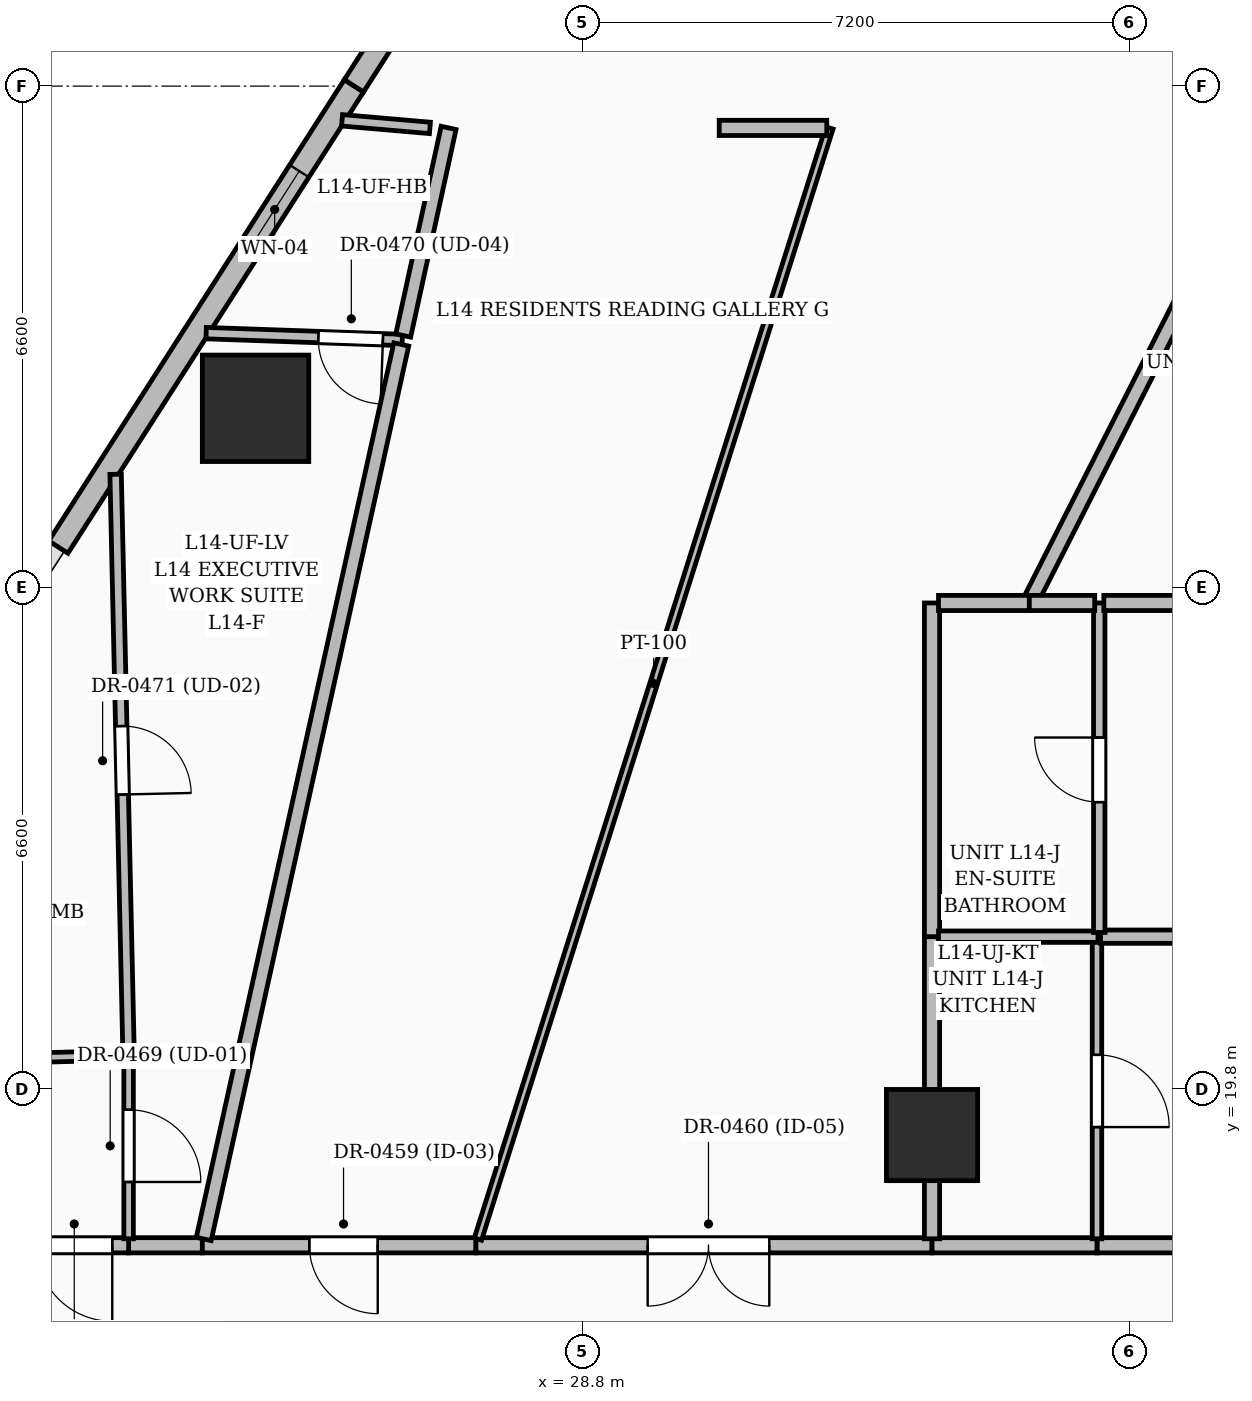
"""IFC4 building model, lengths in metres.
Left out: names, types, materials, properties, quantities, classifications, styles, units other than length and angle.
Written with IfcOpenShell. Run it as: python <this file> out.ifc"""

import sys

from ifc_helpers import new_model, si_unit, direction, frame, frame_2d, origin, origin_2d, place, context, subcontext, project, spatial, rectangle, extrude, element, fill, save


model = new_model("IFC4")
c1 = context("Model", 3, precision=1e-05, world=origin(), true_north=direction((0.0, 1.0)))
c2 = subcontext(c1, "Body", "Model", "MODEL_VIEW")
j1 = project(units=[si_unit("LENGTHUNIT", "METRE"), si_unit("PLANEANGLEUNIT", "RADIAN")], contexts=[c1])
p1 = place(None, origin())
s1 = spatial("IfcSite", under=j1, at=p1, CompositionType="ELEMENT")
p2 = place(p1, origin())
s2 = spatial("IfcBuilding", under=s1, at=p2, CompositionType="ELEMENT")
p3 = place(p2, frame((0.0, 0.0, 60.6)))
s3 = spatial("IfcBuildingStorey", under=s2, at=p3, CompositionType="ELEMENT", Elevation=60.6)
p4 = place(p3, frame((33.4, 19.2, 0.0), z_axis=(0.0, 0.0, 1.0), x_axis=(1.0, 0.0, 0.0)))
e1 = element("IfcColumn", 1, at=p4, inside=s3, PredefinedType="COLUMN", context=c2, shape_type="SweptSolid", body=[
    extrude(rectangle(XDim=1.2, YDim=1.2, at=origin_2d()), origin(), (0.0, 0.0, 1.0), 3.6),
])
p5 = place(p3, frame((24.5, 28.761, 0.0), z_axis=(0.0, 0.0, 1.0), x_axis=(1.0, 0.0, 0.0)))
e2 = element("IfcColumn", 2, at=p5, inside=s3, PredefinedType="COLUMN", context=c2, shape_type="SweptSolid", body=[
    extrude(rectangle(XDim=1.4, YDim=1.4, at=origin_2d()), origin(), (0.0, 0.0, 1.0), 3.6),
])
p6 = place(p3, frame((21.906, 26.935, 0.0), z_axis=(0.0, 0.0, 1.0), x_axis=(0.5395054239, 0.841982124265, 0.0)))
e3 = element("IfcWall", 3, at=p6, inside=s3, PredefinedType="SOLIDWALL", context=c2, shape_type="SweptSolid", body=[
    extrude(rectangle(XDim=7.207, YDim=0.3, at=frame_2d((3.604, 0.0))), origin(), (0.0, 0.0, 1.0), 3.35),
])
p7 = place(p6, frame((4.675, 0.0, 0.8)))
e4 = element("IfcOpeningElement", 4, at=p7, cuts=e3, PredefinedType="OPENING", context=c2, shape_type="SweptSolid", body=[
    extrude(rectangle(XDim=1.2, YDim=1.8, at=frame_2d((0.6, 0.9))), frame((0.0, 0.16, 0.0), z_axis=(0.0, -1.0, 0.0), x_axis=(1.0, 0.0, 0.0)), (0.0, 0.0, 1.0), 0.32),
])
p8 = place(p3, frame((25.794, 33.003, 0.0), z_axis=(0.0, 0.0, 1.0), x_axis=(0.539514050947, 0.841976596367, 0.0)))
e5 = element("IfcWall", 5, at=p8, inside=s3, PredefinedType="SOLIDWALL", context=c2, shape_type="SweptSolid", body=[
    extrude(rectangle(XDim=7.207, YDim=0.3, at=frame_2d((3.604, 0.0))), origin(), (0.0, 0.0, 1.0), 3.35),
])
p9 = place(p8, frame((3.325, 0.0, 0.6)))
e6 = element("IfcOpeningElement", 6, at=p9, cuts=e5, PredefinedType="OPENING", context=c2, shape_type="SweptSolid", body=[
    extrude(rectangle(XDim=2.4, YDim=2.1, at=frame_2d((1.2, 1.05))), frame((0.0, 0.16, 0.0), z_axis=(0.0, -1.0, 0.0), x_axis=(1.0, 0.0, 0.0)), (0.0, 0.0, 1.0), 0.32),
])
p10 = place(p3, frame((23.8, 17.75, 0.0), z_axis=(0.0, 0.0, 1.0), x_axis=(-1.0, 0.0, 0.0)))
e7 = element("IfcWall", 7, at=p10, inside=s3, PredefinedType="PARTITIONING", context=c2, shape_type="SweptSolid", body=[
    extrude(rectangle(XDim=0.97, YDim=0.2, at=frame_2d((0.485, 0.0))), origin(), (0.0, 0.0, 1.0), 2.279),
])
p11 = place(p3, frame((22.83, 17.75, 0.0), z_axis=(0.0, 0.0, 1.0), x_axis=(-1.0, 0.0, 0.0)))
e8 = element("IfcWall", 8, at=p11, inside=s3, PredefinedType="PARTITIONING", context=c2, shape_type="SweptSolid", body=[
    extrude(rectangle(XDim=1.345, YDim=0.2, at=frame_2d((0.672, 0.0))), origin(), (0.0, 0.0, 1.0), 3.35),
])
p12 = place(p11, frame((0.215, 0.0, 0.0)))
e9 = element("IfcOpeningElement", 9, at=p12, cuts=e8, PredefinedType="OPENING", context=c2, shape_type="SweptSolid", body=[
    extrude(rectangle(XDim=1.0, YDim=2.2, at=frame_2d((0.5, 1.1))), frame((0.0, 0.11, 0.0), z_axis=(0.0, -1.0, 0.0), x_axis=(1.0, 0.0, 0.0)), (0.0, 0.0, 1.0), 0.22),
])
p13 = place(p3, frame((27.4, 17.75, 0.0), z_axis=(0.0, 0.0, 1.0), x_axis=(-1.0, 0.0, 0.0)))
e10 = element("IfcWall", 10, at=p13, inside=s3, PredefinedType="PARTITIONING", context=c2, shape_type="SweptSolid", body=[
    extrude(rectangle(XDim=3.6, YDim=0.2, at=frame_2d((1.8, 0.0))), origin(), (0.0, 0.0, 1.0), 2.279),
])
p14 = place(p13, frame((1.292, 0.0, 0.0)))
e11 = element("IfcOpeningElement", 11, at=p14, cuts=e10, PredefinedType="OPENING", context=c2, shape_type="SweptSolid", body=[
    extrude(rectangle(XDim=0.9, YDim=2.1, at=frame_2d((0.45, 1.05))), frame((0.0, 0.11, 0.0), z_axis=(0.0, -1.0, 0.0), x_axis=(1.0, 0.0, 0.0)), (0.0, 0.0, 1.0), 0.22),
])
p15 = place(p3, frame((33.4, 17.75, 0.0), z_axis=(0.0, 0.0, 1.0), x_axis=(-1.0, 0.0, 0.0)))
e12 = element("IfcWall", 12, at=p15, inside=s3, PredefinedType="PARTITIONING", context=c2, shape_type="SweptSolid", body=[
    extrude(rectangle(XDim=6.0, YDim=0.2, at=frame_2d((3.0, 0.0))), origin(), (0.0, 0.0, 1.0), 3.35),
])
p16 = place(p15, frame((2.141, 0.0, 0.0)))
e13 = element("IfcOpeningElement", 13, at=p16, cuts=e12, PredefinedType="OPENING", context=c2, shape_type="SweptSolid", body=[
    extrude(rectangle(XDim=1.6, YDim=2.3, at=frame_2d((0.8, 1.15))), frame((0.0, 0.11, 0.0), z_axis=(0.0, -1.0, 0.0), x_axis=(1.0, 0.0, 0.0)), (0.0, 0.0, 1.0), 0.22),
])
p17 = place(p3, frame((41.05, 17.75, 0.0), z_axis=(0.0, 0.0, 1.0), x_axis=(-1.0, 0.0, 0.0)))
e14 = element("IfcWall", 14, at=p17, inside=s3, PredefinedType="PARTITIONING", context=c2, shape_type="SweptSolid", body=[
    extrude(rectangle(XDim=5.48, YDim=0.2, at=frame_2d((2.74, 0.0))), origin(), (0.0, 0.0, 1.0), 3.35),
])
p18 = place(p17, frame((2.18, 0.0, 0.0)))
e15 = element("IfcOpeningElement", 15, at=p18, cuts=e14, PredefinedType="OPENING", context=c2, shape_type="SweptSolid", body=[
    extrude(rectangle(XDim=1.0, YDim=2.2, at=frame_2d((0.5, 1.1))), frame((0.0, 0.11, 0.0), z_axis=(0.0, -1.0, 0.0), x_axis=(1.0, 0.0, 0.0)), (0.0, 0.0, 1.0), 0.22),
])
p19 = place(p3, frame((35.57, 17.75, 0.0), z_axis=(0.0, 0.0, 1.0), x_axis=(-1.0, 0.0, 0.0)))
e16 = element("IfcWall", 16, at=p19, inside=s3, PredefinedType="PARTITIONING", context=c2, shape_type="SweptSolid", body=[
    extrude(rectangle(XDim=2.17, YDim=0.2, at=frame_2d((1.085, 0.0))), origin(), (0.0, 0.0, 1.0), 2.309),
])
p20 = place(p3, frame((26.43, 29.66, 0.0), z_axis=(0.0, 0.0, 1.0), x_axis=(-0.999390852653, 0.034898762622, 0.0)))
e17 = element("IfcWall", 17, at=p20, inside=s3, PredefinedType="PARTITIONING", context=c2, shape_type="SweptSolid", body=[
    extrude(rectangle(XDim=2.581, YDim=0.15, at=frame_2d((1.291, 0.0))), origin(), (0.0, 0.0, 1.0), 2.37),
])
p21 = place(p20, frame((0.254, 0.0, 0.0)))
e18 = element("IfcOpeningElement", 18, at=p21, cuts=e17, PredefinedType="OPENING", context=c2, shape_type="SweptSolid", body=[
    extrude(rectangle(XDim=0.85, YDim=2.1, at=frame_2d((0.425, 1.05))), frame((0.0, 0.085, 0.0), z_axis=(0.0, -1.0, 0.0), x_axis=(1.0, 0.0, 0.0)), (0.0, 0.0, 1.0), 0.17),
])
p22 = place(p3, frame((22.83, 20.25, 0.0), z_axis=(0.0, 0.0, 1.0), x_axis=(0.0, -1.0, 0.0)))
e19 = element("IfcWall", 19, at=p22, inside=s3, PredefinedType="PARTITIONING", context=c2, shape_type="SweptSolid", body=[
    extrude(rectangle(XDim=2.415, YDim=0.125, at=frame_2d((1.208, 0.0))), origin(), (0.0, 0.0, 1.0), 2.279),
])
p23 = place(p22, frame((0.717, 0.0, 0.0)))
e20 = element("IfcOpeningElement", 20, at=p23, cuts=e19, PredefinedType="OPENING", context=c2, shape_type="SweptSolid", body=[
    extrude(rectangle(XDim=0.95, YDim=2.2, at=frame_2d((0.475, 1.1))), frame((0.0, 0.072, 0.0), z_axis=(0.0, -1.0, 0.0), x_axis=(1.0, 0.0, 0.0)), (0.0, 0.0, 1.0), 0.145),
])
p24 = place(p3, frame((22.659, 27.893, 0.0), z_axis=(0.0, 0.0, 1.0), x_axis=(0.022386262274, -0.99974939623, 0.0)))
e21 = element("IfcWall", 21, at=p24, inside=s3, PredefinedType="PARTITIONING", context=c2, shape_type="SweptSolid", body=[
    extrude(rectangle(XDim=7.645, YDim=0.15, at=frame_2d((3.823, 0.0))), origin(), (0.0, 0.0, 1.0), 2.37),
])
p25 = place(p24, frame((3.314, 0.0, 0.0)))
e22 = element("IfcOpeningElement", 22, at=p25, cuts=e21, PredefinedType="OPENING", context=c2, shape_type="SweptSolid", body=[
    extrude(rectangle(XDim=0.9, YDim=2.15, at=frame_2d((0.45, 1.075))), frame((0.0, 0.085, 0.0), z_axis=(0.0, -1.0, 0.0), x_axis=(1.0, 0.0, 0.0)), (0.0, 0.0, 1.0), 0.17),
])
p26 = place(p3, frame((23.818, 17.833, 0.0), z_axis=(0.0, 0.0, 1.0), x_axis=(0.215621860536, 0.976476939441, 0.0)))
e23 = element("IfcWall", 23, at=p26, inside=s3, PredefinedType="PARTITIONING", context=c2, shape_type="SweptSolid", body=[
    extrude(rectangle(XDim=12.052, YDim=0.2, at=frame_2d((6.026, 0.0))), origin(), (0.0, 0.0, 1.0), 2.279),
])
p27 = place(p3, frame((26.443, 29.719, 0.0), z_axis=(0.0, 0.0, 1.0), x_axis=(0.213582296567, 0.97692507522, 0.0)))
e24 = element("IfcWall", 24, at=p27, inside=s3, PredefinedType="PARTITIONING", context=c2, shape_type="SweptSolid", body=[
    extrude(rectangle(XDim=2.796, YDim=0.2, at=frame_2d((1.398, 0.0))), origin(), (0.0, 0.0, 1.0), 2.37),
])
p28 = place(p3, frame((22.782, 20.249, 0.0), z_axis=(0.0, 0.0, 1.0), x_axis=(-0.999665137203, -0.025876890473, 0.0)))
e25 = element("IfcWall", 25, at=p28, inside=s3, PredefinedType="PARTITIONING", context=c2, shape_type="SweptSolid", body=[
    extrude(rectangle(XDim=3.944, YDim=0.125, at=frame_2d((1.972, 0.0))), origin(), (0.0, 0.0, 1.0), 2.279),
])
p29 = place(p3, frame((27.426, 17.831, 0.0), z_axis=(0.0, 0.0, 1.0), x_axis=(0.301606844208, 0.95343238435, 0.0)))
e26 = element("IfcWall", 26, at=p29, inside=s3, PredefinedType="PARTITIONING", context=c2, shape_type="SweptSolid", body=[
    extrude(rectangle(XDim=15.333, YDim=0.1, at=frame_2d((7.667, 0.0))), origin(), (0.0, 0.0, 1.0), 2.279),
])
p30 = place(p3, frame((32.015, 32.45, 0.0), z_axis=(0.0, 0.0, 1.0), x_axis=(-1.0, 0.0, 0.0)))
e27 = element("IfcWall", 27, at=p30, inside=s3, PredefinedType="PARTITIONING", context=c2, shape_type="SweptSolid", body=[
    extrude(rectangle(XDim=1.415, YDim=0.2, at=frame_2d((0.708, 0.0))), origin(), (0.0, 0.0, 1.0), 2.712),
])
p31 = place(p3, frame((33.4, 17.835, 0.0), z_axis=(0.0, 0.0, 1.0), x_axis=(0.0, 1.0, 0.0)))
e28 = element("IfcWall", 28, at=p31, inside=s3, PredefinedType="PARTITIONING", context=c2, shape_type="SweptSolid", body=[
    extrude(rectangle(XDim=3.975, YDim=0.2, at=frame_2d((1.988, 0.0))), origin(), (0.0, 0.0, 1.0), 2.309),
])
p32 = place(p3, frame((33.4, 21.81, 0.0), z_axis=(0.0, 0.0, 1.0), x_axis=(0.0, 1.0, 0.0)))
e29 = element("IfcWall", 29, at=p32, inside=s3, PredefinedType="PARTITIONING", context=c2, shape_type="SweptSolid", body=[
    extrude(rectangle(XDim=4.39, YDim=0.2, at=frame_2d((2.195, 0.0))), origin(), (0.0, 0.0, 1.0), 2.712),
])
p33 = place(p3, frame((33.485, 26.2, 0.0), z_axis=(0.0, 0.0, 1.0), x_axis=(1.0, 0.0, 0.0)))
e30 = element("IfcWall", 30, at=p33, inside=s3, PredefinedType="PARTITIONING", context=c2, shape_type="SweptSolid", body=[
    extrude(rectangle(XDim=1.195, YDim=0.2, at=frame_2d((0.597, 0.0))), origin(), (0.0, 0.0, 1.0), 2.712),
])
p34 = place(p3, frame((34.719, 26.276, 0.0), z_axis=(0.0, 0.0, 1.0), x_axis=(0.452354999019, 0.891837964466, 0.0)))
e31 = element("IfcWall", 31, at=p34, inside=s3, PredefinedType="PARTITIONING", context=c2, shape_type="SweptSolid", body=[
    extrude(rectangle(XDim=6.923, YDim=0.2, at=frame_2d((3.461, 0.0))), origin(), (0.0, 0.0, 1.0), 2.279),
])
p35 = place(p3, frame((35.57, 21.81, 0.0), z_axis=(0.0, 0.0, 1.0), x_axis=(0.0, -1.0, 0.0)))
e32 = element("IfcWall", 32, at=p35, inside=s3, PredefinedType="PARTITIONING", context=c2, shape_type="SweptSolid", body=[
    extrude(rectangle(XDim=3.975, YDim=0.125, at=frame_2d((1.988, 0.0))), origin(), (0.0, 0.0, 1.0), 3.35),
])
p36 = place(p35, frame((1.555, 0.0, 0.0)))
e33 = element("IfcOpeningElement", 33, at=p36, cuts=e32, PredefinedType="OPENING", context=c2, shape_type="SweptSolid", body=[
    extrude(rectangle(XDim=0.95, YDim=2.2, at=frame_2d((0.475, 1.1))), frame((0.0, 0.072, 0.0), z_axis=(0.0, -1.0, 0.0), x_axis=(1.0, 0.0, 0.0)), (0.0, 0.0, 1.0), 0.145),
])
p37 = place(p3, frame((38.69, 21.81, 0.0), z_axis=(0.0, 0.0, 1.0), x_axis=(-1.0, 0.0, 0.0)))
e34 = element("IfcWall", 34, at=p37, inside=s3, PredefinedType="PARTITIONING", context=c2, shape_type="SweptSolid", body=[
    extrude(rectangle(XDim=3.073, YDim=0.175, at=frame_2d((1.536, 0.0))), origin(), (0.0, 0.0, 1.0), 3.35),
])
p38 = place(p37, frame((1.053, 0.0, 0.0)))
e35 = element("IfcOpeningElement", 35, at=p38, cuts=e34, PredefinedType="OPENING", context=c2, shape_type="SweptSolid", body=[
    extrude(rectangle(XDim=0.9, YDim=2.15, at=frame_2d((0.45, 1.075))), frame((0.0, 0.097, 0.0), z_axis=(0.0, -1.0, 0.0), x_axis=(1.0, 0.0, 0.0)), (0.0, 0.0, 1.0), 0.195),
])
p39 = place(p3, frame((35.583, 21.81, 0.0), z_axis=(0.0, 0.0, 1.0), x_axis=(-1.0, 0.0, 0.0)))
e36 = element("IfcWall", 36, at=p39, inside=s3, PredefinedType="PARTITIONING", context=c2, shape_type="SweptSolid", body=[
    extrude(rectangle(XDim=2.097, YDim=0.15, at=frame_2d((1.049, 0.0))), origin(), (0.0, 0.0, 1.0), 2.309),
])
p40 = place(p3, frame((35.6, 21.865, 0.0), z_axis=(0.0, 0.0, 1.0), x_axis=(0.0, 1.0, 0.0)))
e37 = element("IfcWall", 37, at=p40, inside=s3, PredefinedType="PARTITIONING", context=c2, shape_type="SweptSolid", body=[
    extrude(rectangle(XDim=4.335, YDim=0.15, at=frame_2d((2.167, 0.0))), origin(), (0.0, 0.0, 1.0), 2.309),
])
p41 = place(p40, frame((1.715, 0.0, 0.0)))
e38 = element("IfcOpeningElement", 38, at=p41, cuts=e37, PredefinedType="OPENING", context=c2, shape_type="SweptSolid", body=[
    extrude(rectangle(XDim=0.85, YDim=2.1, at=frame_2d((0.425, 1.05))), frame((0.0, 0.085, 0.0), z_axis=(0.0, -1.0, 0.0), x_axis=(1.0, 0.0, 0.0)), (0.0, 0.0, 1.0), 0.17),
])
p42 = place(p3, frame((38.655, 26.2, 0.0), z_axis=(0.0, 0.0, 1.0), x_axis=(-1.0, 0.0, 0.0)))
e39 = element("IfcWall", 39, at=p42, inside=s3, PredefinedType="PARTITIONING", context=c2, shape_type="SweptSolid", body=[
    extrude(rectangle(XDim=2.995, YDim=0.2, at=frame_2d((1.498, 0.0))), origin(), (0.0, 0.0, 1.0), 2.37),
])
p43 = place(p3, frame((35.54, 26.2, 0.0), z_axis=(0.0, 0.0, 1.0), x_axis=(-1.0, 0.0, 0.0)))
e40 = element("IfcWall", 40, at=p43, inside=s3, PredefinedType="PARTITIONING", context=c2, shape_type="SweptSolid", body=[
    extrude(rectangle(XDim=0.86, YDim=0.2, at=frame_2d((0.43, 0.0))), origin(), (0.0, 0.0, 1.0), 3.35),
])
p44 = place(p3, frame((26.794, 32.45, 0.0), z_axis=(0.0, 0.0, 1.0), x_axis=(-0.996272102626, 0.086266433385, 0.0)))
e41 = element("IfcWall", 41, at=p44, inside=s3, PredefinedType="PARTITIONING", context=c2, shape_type="SweptSolid", body=[
    extrude(rectangle(XDim=1.16, YDim=0.15, at=frame_2d((0.58, 0.0))), origin(), (0.0, 0.0, 1.0), 2.37),
])
p45 = place(p7, origin())
e42 = element("IfcWindow", 42, at=p45, inside=s3, PartitioningType="SINGLE_PANEL", PredefinedType="WINDOW", context=c2, shape_type="SweptSolid", body=[
    extrude(rectangle(XDim=1.2, YDim=1.8, at=frame_2d((0.6, 0.9))), frame((0.0, 0.03, 0.0), z_axis=(0.0, -1.0, 0.0), x_axis=(1.0, 0.0, 0.0)), (0.0, 0.0, 1.0), 0.06),
])
fill(e4, e42)
p46 = place(p14, origin())
e43 = element("IfcDoor", 43, at=p46, inside=s3, OperationType="SINGLE_SWING_LEFT", PredefinedType="DOOR", context=c2, shape_type="SweptSolid", body=[
    extrude(rectangle(XDim=0.9, YDim=2.1, at=frame_2d((0.45, 1.05))), frame((0.0, 0.025, 0.0), z_axis=(0.0, -1.0, 0.0), x_axis=(1.0, 0.0, 0.0)), (0.0, 0.0, 1.0), 0.05),
])
fill(e11, e43)
p47 = place(p16, origin())
e44 = element("IfcDoor", 44, at=p47, inside=s3, OperationType="DOUBLE_DOOR_SINGLE_SWING", PredefinedType="DOOR", context=c2, shape_type="SweptSolid", body=[
    extrude(rectangle(XDim=1.6, YDim=2.3, at=frame_2d((0.8, 1.15))), frame((0.0, 0.025, 0.0), z_axis=(0.0, -1.0, 0.0), x_axis=(1.0, 0.0, 0.0)), (0.0, 0.0, 1.0), 0.05),
])
fill(e13, e44)
p48 = place(p12, origin())
e45 = element("IfcDoor", 45, at=p48, inside=s3, OperationType="SINGLE_SWING_LEFT", PredefinedType="DOOR", context=c2, shape_type="SweptSolid", body=[
    extrude(rectangle(XDim=1.0, YDim=2.2, at=frame_2d((0.5, 1.1))), frame((0.0, 0.025, 0.0), z_axis=(0.0, -1.0, 0.0), x_axis=(1.0, 0.0, 0.0)), (0.0, 0.0, 1.0), 0.05),
])
fill(e9, e45)
p49 = place(p23, origin())
e46 = element("IfcDoor", 46, at=p49, inside=s3, OperationType="SINGLE_SWING_RIGHT", PredefinedType="DOOR", context=c2, shape_type="SweptSolid", body=[
    extrude(rectangle(XDim=0.95, YDim=2.2, at=frame_2d((0.475, 1.1))), frame((0.0, 0.025, 0.0), z_axis=(0.0, -1.0, 0.0), x_axis=(1.0, 0.0, 0.0)), (0.0, 0.0, 1.0), 0.05),
])
fill(e20, e46)
p50 = place(p21, origin())
e47 = element("IfcDoor", 47, at=p50, inside=s3, OperationType="SINGLE_SWING_LEFT", PredefinedType="DOOR", context=c2, shape_type="SweptSolid", body=[
    extrude(rectangle(XDim=0.85, YDim=2.1, at=frame_2d((0.425, 1.05))), frame((0.0, 0.025, 0.0), z_axis=(0.0, -1.0, 0.0), x_axis=(1.0, 0.0, 0.0)), (0.0, 0.0, 1.0), 0.05),
])
fill(e18, e47)
p51 = place(p25, origin())
e48 = element("IfcDoor", 48, at=p51, inside=s3, OperationType="SINGLE_SWING_RIGHT", PredefinedType="DOOR", context=c2, shape_type="SweptSolid", body=[
    extrude(rectangle(XDim=0.9, YDim=2.15, at=frame_2d((0.45, 1.075))), frame((0.0, 0.025, 0.0), z_axis=(0.0, -1.0, 0.0), x_axis=(1.0, 0.0, 0.0)), (0.0, 0.0, 1.0), 0.05),
])
fill(e22, e48)
p52 = place(p36, origin())
e49 = element("IfcDoor", 49, at=p52, inside=s3, OperationType="SINGLE_SWING_RIGHT", PredefinedType="DOOR", context=c2, shape_type="SweptSolid", body=[
    extrude(rectangle(XDim=0.95, YDim=2.2, at=frame_2d((0.475, 1.1))), frame((0.0, 0.025, 0.0), z_axis=(0.0, -1.0, 0.0), x_axis=(1.0, 0.0, 0.0)), (0.0, 0.0, 1.0), 0.05),
])
fill(e33, e49)
p53 = place(p41, origin())
e50 = element("IfcDoor", 50, at=p53, inside=s3, OperationType="SINGLE_SWING_RIGHT", PredefinedType="DOOR", context=c2, shape_type="SweptSolid", body=[
    extrude(rectangle(XDim=0.85, YDim=2.1, at=frame_2d((0.425, 1.05))), frame((0.0, 0.025, 0.0), z_axis=(0.0, -1.0, 0.0), x_axis=(1.0, 0.0, 0.0)), (0.0, 0.0, 1.0), 0.05),
])
fill(e38, e50)
save(model, sys.argv[1])
